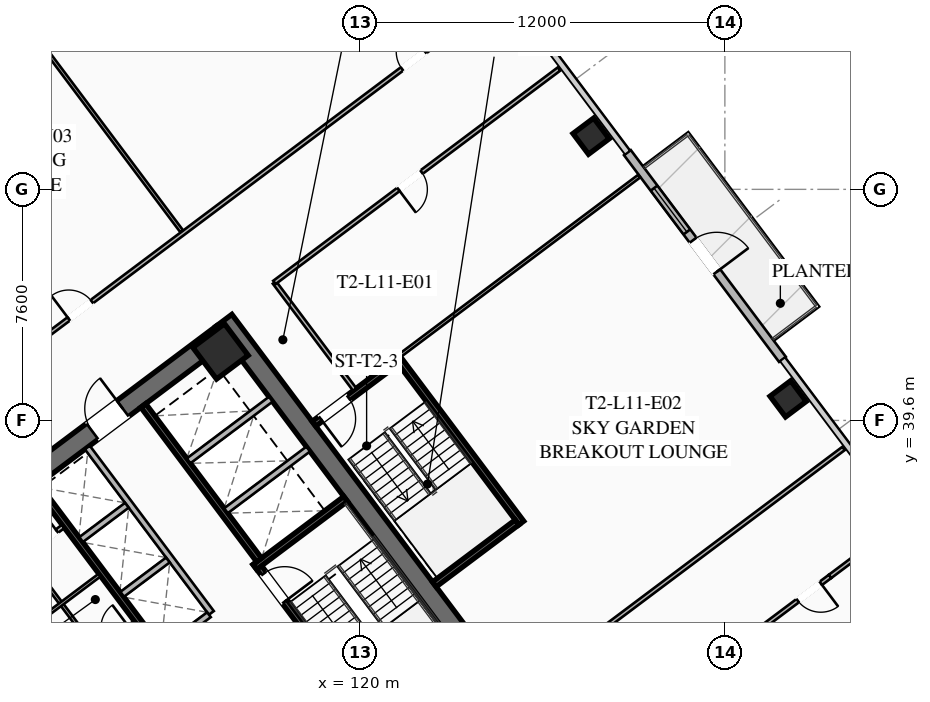
"""IFC4 building model, lengths in metres.
Left out: names, types, materials, properties, quantities, classifications, styles, units other than length and angle.
Written with IfcOpenShell. Run it as: python <this file> out.ifc"""

import sys

from ifc_helpers import new_model, si_unit, direction, frame, frame_2d, origin, origin_2d, place, context, subcontext, project, spatial, rectangle, hollow_rectangle, extrude, element, fill, save


model = new_model("IFC4")
c1 = context("Model", 3, precision=1e-05, world=origin(), true_north=direction((0.0, 1.0)))
c2 = subcontext(c1, "Body", "Model", "MODEL_VIEW")
j1 = project(units=[si_unit("LENGTHUNIT", "METRE"), si_unit("PLANEANGLEUNIT", "RADIAN")], contexts=[c1])
p1 = place(None, origin())
s1 = spatial("IfcSite", under=j1, at=p1, CompositionType="ELEMENT")
p2 = place(p1, origin())
s2 = spatial("IfcBuilding", under=s1, at=p2, CompositionType="ELEMENT")
p3 = place(p2, frame((0.0, 0.0, 45.9)))
s3 = spatial("IfcBuildingStorey", under=s2, at=p3, CompositionType="ELEMENT", Elevation=45.9)
for number, where, z_axis, x_axis in (
    (1, (112.476, 21.107, 0.0), (0.0, 0.0, 1.0), (-0.6, 0.8, 0.0)),
    (2, (115.524, 42.893, 0.0), (0.0, 0.0, 1.0), (0.6, -0.8, 0.0)),
):
    element("IfcWall", number, at=place(p3, frame(where, z_axis=z_axis, x_axis=x_axis)), inside=s3, PredefinedType="SHEAR", context=c2, shape_type="SweptSolid", body=[
        extrude(rectangle(XDim=15.6, YDim=0.65, at=frame_2d((7.8, 0.0))), origin(), (0.0, 0.0, 1.0), 3.55),
    ])
p4 = place(p3, frame((103.571, 33.522, 0.0), z_axis=(0.0, 0.0, 1.0), x_axis=(0.799998028465, 0.600002628705, 0.0)))
e3 = element("IfcWall", 3, at=p4, inside=s3, PredefinedType="SHEAR", context=c2, shape_type="SweptSolid", body=[
    extrude(rectangle(XDim=14.86, YDim=0.65, at=frame_2d((7.43, 0.0))), origin(), (0.0, 0.0, 1.0), 3.55),
])
p5 = place(p4, frame((4.48, 0.0, 0.0)))
e4 = element("IfcOpeningElement", 4, at=p5, cuts=e3, PredefinedType="OPENING", context=c2, shape_type="SweptSolid", body=[
    extrude(rectangle(XDim=1.25, YDim=2.25, at=frame_2d((0.625, 1.125))), frame((0.0, 0.335, 0.0), z_axis=(0.0, -1.0, 0.0), x_axis=(1.0, 0.0, 0.0)), (0.0, 0.0, 1.0), 0.67),
])
p6 = place(p4, frame((9.53, 0.0, 0.0)))
e5 = element("IfcOpeningElement", 5, at=p6, cuts=e3, PredefinedType="OPENING", context=c2, shape_type="SweptSolid", body=[
    extrude(rectangle(XDim=1.25, YDim=2.25, at=frame_2d((0.625, 1.125))), frame((0.0, 0.335, 0.0), z_axis=(0.0, -1.0, 0.0), x_axis=(1.0, 0.0, 0.0)), (0.0, 0.0, 1.0), 0.67),
])
p7 = place(p3, frame((115.41, 41.87, 0.0), z_axis=(0.0, 0.0, 1.0), x_axis=(0.799999996291, 0.600000004945, 0.0)))
e6 = element("IfcColumn", 6, at=p7, inside=s3, PredefinedType="COLUMN", context=c2, shape_type="SweptSolid", body=[
    extrude(hollow_rectangle(XDim=1.3, YDim=1.3, WallThickness=0.05, at=origin_2d()), origin(), (0.0, 0.0, 1.0), 3.35),
])
for number, where, z_axis, x_axis in (
    (7, (134.08, 40.31, 0.0), (0.0, 0.0, 1.0), (0.8, 0.6, 0.0)),
    (8, (127.6, 48.95, 0.0), (0.0, 0.0, 1.0), (0.8, 0.6, 0.0)),
):
    element("IfcColumn", number, at=place(p3, frame(where, z_axis=z_axis, x_axis=x_axis)), inside=s3, PredefinedType="COLUMN", context=c2, shape_type="SweptSolid", body=[
        extrude(hollow_rectangle(XDim=0.85, YDim=0.85, WallThickness=0.035, at=origin_2d()), origin(), (0.0, 0.0, 1.0), 3.35),
    ])
p8 = place(p3, frame((128.794, 48.408, 0.0), z_axis=(0.0, 0.0, 1.0), x_axis=(0.600004595526, -0.799996553335, 0.0)))
e9 = element("IfcWall", 9, at=p8, inside=s3, PredefinedType="SOLIDWALL", context=c2, shape_type="SweptSolid", body=[
    extrude(rectangle(XDim=8.5, YDim=0.28, at=frame_2d((4.25, 0.0))), origin(), (0.0, 0.0, 1.0), 3.35),
])
p9 = place(p8, frame((3.6, 0.0, 0.0)))
e10 = element("IfcOpeningElement", 10, at=p9, cuts=e9, PredefinedType="OPENING", context=c2, shape_type="SweptSolid", body=[
    extrude(rectangle(XDim=1.3, YDim=2.15, at=frame_2d((0.65, 1.075))), frame((0.0, 0.15, 0.0), z_axis=(0.0, -1.0, 0.0), x_axis=(1.0, 0.0, 0.0)), (0.0, 0.0, 1.0), 0.3),
])
p10 = place(p8, frame((1.46, 0.0, 0.85)))
e11 = element("IfcOpeningElement", 11, at=p10, cuts=e9, PredefinedType="OPENING", context=c2, shape_type="SweptSolid", body=[
    extrude(rectangle(XDim=1.8, YDim=1.92, at=frame_2d((0.9, 0.96))), frame((0.0, 0.15, 0.0), z_axis=(0.0, -1.0, 0.0), x_axis=(1.0, 0.0, 0.0)), (0.0, 0.0, 1.0), 0.3),
])
p11 = place(p3, frame((111.44, 29.08, 0.0), z_axis=(0.0, 0.0, 1.0), x_axis=(-0.600009827119, 0.799992629566, 0.0)))
e12 = element("IfcWall", 12, at=p11, inside=s3, PredefinedType="SHEAR", context=c2, shape_type="SweptSolid", body=[
    extrude(rectangle(XDim=7.95, YDim=0.2, at=frame_2d((3.975, 0.0))), origin(), (0.0, 0.0, 1.0), 3.35),
])
p12 = place(p11, frame((0.45, 0.0, 0.0)))
e13 = element("IfcOpeningElement", 13, at=p12, cuts=e12, PredefinedType="OPENING", context=c2, shape_type="SweptSolid", body=[
    extrude(rectangle(XDim=1.15, YDim=2.2, at=frame_2d((0.575, 1.1))), frame((0.0, 0.11, 0.0), z_axis=(0.0, -1.0, 0.0), x_axis=(1.0, 0.0, 0.0)), (0.0, 0.0, 1.0), 0.22),
])
p13 = place(p3, frame((116.56, 34.92, 0.0), z_axis=(0.0, 0.0, 1.0), x_axis=(0.600009827119, -0.799992629566, 0.0)))
e14 = element("IfcWall", 14, at=p13, inside=s3, PredefinedType="SHEAR", context=c2, shape_type="SweptSolid", body=[
    extrude(rectangle(XDim=7.95, YDim=0.2, at=frame_2d((3.975, 0.0))), origin(), (0.0, 0.0, 1.0), 3.35),
])
p14 = place(p13, frame((0.45, 0.0, 0.0)))
e15 = element("IfcOpeningElement", 15, at=p14, cuts=e14, PredefinedType="OPENING", context=c2, shape_type="SweptSolid", body=[
    extrude(rectangle(XDim=1.15, YDim=2.2, at=frame_2d((0.575, 1.1))), frame((0.0, 0.11, 0.0), z_axis=(0.0, -1.0, 0.0), x_axis=(1.0, 0.0, 0.0)), (0.0, 0.0, 1.0), 0.22),
])
p15 = place(p3, frame((116.54, 34.78, 0.0), z_axis=(0.0, 0.0, 1.0), x_axis=(0.799984290658, 0.600020945218, 0.0)))
e16 = element("IfcWall", 16, at=p15, inside=s3, PredefinedType="SHEAR", context=c2, shape_type="SweptSolid", body=[
    extrude(rectangle(XDim=3.73, YDim=0.2, at=frame_2d((1.865, 0.0))), origin(), (0.0, 0.0, 1.0), 3.35),
])
p16 = place(p3, frame((117.938, 26.016, 0.0), z_axis=(0.0, 0.0, 1.0), x_axis=(-0.600005463273, 0.799995902516, 0.0)))
e17 = element("IfcWall", 17, at=p16, inside=s3, PredefinedType="SHEAR", context=c2, shape_type="SweptSolid", body=[
    extrude(rectangle(XDim=14.3, YDim=0.2, at=frame_2d((7.15, 0.0))), origin(), (0.0, 0.0, 1.0), 3.35),
])
p17 = place(p3, frame((110.104, 31.028, 0.0), z_axis=(0.0, 0.0, 1.0), x_axis=(0.800018601094, 0.59997519774, 0.0)))
e18 = element("IfcWall", 18, at=p17, inside=s3, PredefinedType="SOLIDWALL", context=c2, shape_type="SweptSolid", body=[
    extrude(rectangle(XDim=3.15, YDim=0.22, at=frame_2d((1.575, 0.0))), origin(), (0.0, 0.0, 1.0), 2.703),
])
p18 = place(p17, frame((0.25, 0.0, 0.0)))
e19 = element("IfcOpeningElement", 19, at=p18, cuts=e18, PredefinedType="OPENING", context=c2, shape_type="SweptSolid", body=[
    extrude(rectangle(XDim=0.95, YDim=2.05, at=frame_2d((0.475, 1.025))), frame((0.0, 0.12, 0.0), z_axis=(0.0, -1.0, 0.0), x_axis=(1.0, 0.0, 0.0)), (0.0, 0.0, 1.0), 0.24),
])
p19 = place(p17, frame((1.95, 0.0, 0.0)))
e20 = element("IfcOpeningElement", 20, at=p19, cuts=e18, PredefinedType="OPENING", context=c2, shape_type="SweptSolid", body=[
    extrude(rectangle(XDim=0.95, YDim=2.05, at=frame_2d((0.475, 1.025))), frame((0.0, 0.12, 0.0), z_axis=(0.0, -1.0, 0.0), x_axis=(1.0, 0.0, 0.0)), (0.0, 0.0, 1.0), 0.24),
])
p20 = place(p3, frame((112.87, 40.09, 0.0), z_axis=(0.0, 0.0, 1.0), x_axis=(0.599975393228, -0.800018454488, 0.0)))
e21 = element("IfcWall", 21, at=p20, inside=s3, PredefinedType="SHEAR", context=c2, shape_type="SweptSolid", body=[
    extrude(rectangle(XDim=6.35, YDim=0.2, at=frame_2d((3.175, 0.0))), origin(), (0.0, 0.0, 1.0), 3.35),
])
for number, where, z_axis, x_axis in (
    (22, (115.59, 36.63, 0.0), (0.0, 0.0, 1.0), (0.8, 0.6, 0.0)),
    (23, (114.36, 38.27, 0.0), (0.0, 0.0, 1.0), (0.8, 0.6, 0.0)),
):
    element("IfcWall", number, at=place(p3, frame(where, z_axis=z_axis, x_axis=x_axis)), inside=s3, PredefinedType="SOLIDWALL", context=c2, shape_type="SweptSolid", body=[
        extrude(rectangle(XDim=3.38, YDim=0.2, at=frame_2d((1.69, 0.0))), origin(), (0.0, 0.0, 1.0), 3.35),
    ])
p21 = place(p3, frame((107.71, 34.22, 0.0), z_axis=(0.0, 0.0, 1.0), x_axis=(0.799981399002, 0.60002480053, 0.0)))
e24 = element("IfcWall", 24, at=p21, inside=s3, PredefinedType="PARTITIONING", context=c2, shape_type="SweptSolid", body=[
    extrude(rectangle(XDim=3.15, YDim=0.135, at=frame_2d((1.575, 0.0))), origin(), (0.0, 0.0, 1.0), 2.703),
])
p22 = place(p21, frame((0.25, 0.0, 0.0)))
e25 = element("IfcOpeningElement", 25, at=p22, cuts=e24, PredefinedType="OPENING", context=c2, shape_type="SweptSolid", body=[
    extrude(rectangle(XDim=0.95, YDim=2.05, at=frame_2d((0.475, 1.025))), frame((0.0, 0.077, 0.0), z_axis=(0.0, -1.0, 0.0), x_axis=(1.0, 0.0, 0.0)), (0.0, 0.0, 1.0), 0.155),
])
p23 = place(p21, frame((1.95, 0.0, 0.0)))
e26 = element("IfcOpeningElement", 26, at=p23, cuts=e24, PredefinedType="OPENING", context=c2, shape_type="SweptSolid", body=[
    extrude(rectangle(XDim=0.95, YDim=2.05, at=frame_2d((0.475, 1.025))), frame((0.0, 0.077, 0.0), z_axis=(0.0, -1.0, 0.0), x_axis=(1.0, 0.0, 0.0)), (0.0, 0.0, 1.0), 0.155),
])
p24 = place(p3, frame((111.296, 32.072, 0.0), z_axis=(0.0, 0.0, 1.0), x_axis=(-0.59995887973, 0.800030838552, 0.0)))
e27 = element("IfcWall", 27, at=p24, inside=s3, PredefinedType="PARTITIONING", context=c2, shape_type="SweptSolid", body=[
    extrude(rectangle(XDim=3.8, YDim=0.11, at=frame_2d((1.9, 0.0))), origin(), (0.0, 0.0, 1.0), 2.703),
])
p25 = place(p3, frame((108.91, 32.62, 0.0), z_axis=(0.0, 0.0, 1.0), x_axis=(0.800018601094, 0.59997519774, 0.0)))
e28 = element("IfcWall", 28, at=p25, inside=s3, PredefinedType="PARTITIONING", context=c2, shape_type="SweptSolid", body=[
    extrude(rectangle(XDim=3.15, YDim=0.11, at=frame_2d((1.575, 0.0))), origin(), (0.0, 0.0, 1.0), 2.703),
])
p26 = place(p3, frame((115.11, 33.27, 0.0), z_axis=(0.0, 0.0, 1.0), x_axis=(-0.600011488909, 0.79999138319, 0.0)))
e29 = element("IfcWall", 29, at=p26, inside=s3, PredefinedType="SOLIDWALL", context=c2, shape_type="SweptSolid", body=[
    extrude(rectangle(XDim=6.8, YDim=0.2, at=frame_2d((3.4, 0.0))), origin(), (0.0, 0.0, 1.0), 3.35),
])
p27 = place(p3, frame((113.526, 32.082, 0.0), z_axis=(0.0, 0.0, 1.0), x_axis=(0.800046745961, 0.599937666993, 0.0)))
e30 = element("IfcWall", 30, at=p27, inside=s3, PredefinedType="SOLIDWALL", context=c2, shape_type="SweptSolid", body=[
    extrude(rectangle(XDim=1.88, YDim=0.2, at=frame_2d((0.94, 0.0))), origin(), (0.0, 0.0, 1.0), 3.35),
])
p28 = place(p3, frame((112.176, 33.882, 0.0), z_axis=(0.0, 0.0, 1.0), x_axis=(0.8, 0.6, 0.0)))
e31 = element("IfcWall", 31, at=p28, inside=s3, PredefinedType="SOLIDWALL", context=c2, shape_type="SweptSolid", body=[
    extrude(rectangle(XDim=1.88, YDim=0.2, at=frame_2d((0.94, 0.0))), origin(), (0.0, 0.0, 1.0), 3.35),
])
p29 = place(p3, frame((110.826, 35.682, 0.0), z_axis=(0.0, 0.0, 1.0), x_axis=(0.799984418148, 0.600020775241, 0.0)))
e32 = element("IfcWall", 32, at=p29, inside=s3, PredefinedType="SOLIDWALL", context=c2, shape_type="SweptSolid", body=[
    extrude(rectangle(XDim=1.88, YDim=0.2, at=frame_2d((0.94, 0.0))), origin(), (0.0, 0.0, 1.0), 3.35),
])
p30 = place(p3, frame((125.304, 36.228, 0.0), z_axis=(0.0, 0.0, 1.0), x_axis=(-0.59998851072, 0.800008616831, 0.0)))
e33 = element("IfcWall", 33, at=p30, inside=s3, PredefinedType="SHEAR", context=c2, shape_type="SweptSolid", body=[
    extrude(rectangle(XDim=6.8, YDim=0.2, at=frame_2d((3.4, 0.0))), origin(), (0.0, 0.0, 1.0), 3.35),
])
p31 = place(p3, frame((121.204, 41.528, 0.0), z_axis=(0.0, 0.0, 1.0), x_axis=(-0.800017232136, -0.599977023131, 0.0)))
e34 = element("IfcWall", 34, at=p31, inside=s3, PredefinedType="SHEAR", context=c2, shape_type="SweptSolid", body=[
    extrude(rectangle(XDim=3.4, YDim=0.2, at=frame_2d((1.7, 0.0))), origin(), (0.0, 0.0, 1.0), 3.35),
])
p32 = place(p31, frame((1.975, 0.0, 0.0)))
e35 = element("IfcOpeningElement", 35, at=p32, cuts=e34, PredefinedType="OPENING", context=c2, shape_type="SweptSolid", body=[
    extrude(rectangle(XDim=1.15, YDim=2.2, at=frame_2d((0.575, 1.1))), frame((0.0, 0.11, 0.0), z_axis=(0.0, -1.0, 0.0), x_axis=(1.0, 0.0, 0.0)), (0.0, 0.0, 1.0), 0.22),
])
p33 = place(p3, frame((122.444, 34.208, 0.0), z_axis=(0.0, 0.0, 1.0), x_axis=(0.79999138319, 0.600011488909, 0.0)))
e36 = element("IfcWall", 36, at=p33, inside=s3, PredefinedType="SHEAR", context=c2, shape_type="SweptSolid", body=[
    extrude(rectangle(XDim=3.4, YDim=0.2, at=frame_2d((1.7, 0.0))), origin(), (0.0, 0.0, 1.0), 3.35),
])
p34 = place(p3, frame((119.824, 40.618, 0.0), z_axis=(0.0, 0.0, 1.0), x_axis=(-0.599982243973, 0.800013316712, 0.0)))
e37 = element("IfcWall", 37, at=p34, inside=s3, PredefinedType="PARTITIONING", context=c2, shape_type="SweptSolid", body=[
    extrude(rectangle(XDim=4.4, YDim=0.135, at=frame_2d((2.2, 0.0))), origin(), (0.0, 0.0, 1.0), 2.703),
])
p35 = place(p3, frame((98.516, 34.012, 0.0), z_axis=(0.0, 0.0, 1.0), x_axis=(0.799998035726, 0.600002619023, 0.0)))
e38 = element("IfcWall", 38, at=p35, inside=s3, PredefinedType="PARTITIONING", context=c2, shape_type="SweptSolid", body=[
    extrude(rectangle(XDim=29.83, YDim=0.135, at=frame_2d((14.915, 0.0))), origin(), (0.0, 0.0, 1.0), 2.703),
])
p36 = place(p35, frame((0.3, 0.0, 0.0)))
e39 = element("IfcOpeningElement", 39, at=p36, cuts=e38, PredefinedType="OPENING", context=c2, shape_type="SweptSolid", body=[
    extrude(rectangle(XDim=0.95, YDim=2.05, at=frame_2d((0.475, 1.025))), frame((0.0, 0.077, 0.0), z_axis=(0.0, -1.0, 0.0), x_axis=(1.0, 0.0, 0.0)), (0.0, 0.0, 1.0), 0.155),
])
p37 = place(p35, frame((10.835, 0.0, 0.0)))
e40 = element("IfcOpeningElement", 40, at=p37, cuts=e38, PredefinedType="OPENING", context=c2, shape_type="SweptSolid", body=[
    extrude(rectangle(XDim=0.95, YDim=2.05, at=frame_2d((0.475, 1.025))), frame((0.0, 0.077, 0.0), z_axis=(0.0, -1.0, 0.0), x_axis=(1.0, 0.0, 0.0)), (0.0, 0.0, 1.0), 0.155),
])
p38 = place(p35, frame((14.879, 0.0, 0.0)))
e41 = element("IfcOpeningElement", 41, at=p38, cuts=e38, PredefinedType="OPENING", context=c2, shape_type="SweptSolid", body=[
    extrude(rectangle(XDim=0.95, YDim=2.05, at=frame_2d((0.475, 1.025))), frame((0.0, 0.077, 0.0), z_axis=(0.0, -1.0, 0.0), x_axis=(1.0, 0.0, 0.0)), (0.0, 0.0, 1.0), 0.155),
])
p39 = place(p35, frame((28.58, 0.0, 0.0)))
e42 = element("IfcOpeningElement", 42, at=p39, cuts=e38, PredefinedType="OPENING", context=c2, shape_type="SweptSolid", body=[
    extrude(rectangle(XDim=0.95, YDim=2.05, at=frame_2d((0.475, 1.025))), frame((0.0, 0.077, 0.0), z_axis=(0.0, -1.0, 0.0), x_axis=(1.0, 0.0, 0.0)), (0.0, 0.0, 1.0), 0.155),
])
p40 = place(p3, frame((114.132, 45.824, 0.0), z_axis=(0.0, 0.0, 1.0), x_axis=(-0.600007301277, 0.79999452399, 0.0)))
e43 = element("IfcWall", 43, at=p40, inside=s3, PredefinedType="PARTITIONING", context=c2, shape_type="SweptSolid", body=[
    extrude(rectangle(XDim=10.7, YDim=0.11, at=frame_2d((5.35, 0.0))), origin(), (0.0, 0.0, 1.0), 2.703),
])
p41 = place(p3, frame((135.46, 34.47, 0.0), z_axis=(0.0, 0.0, 1.0), x_axis=(-0.800000982127, -0.599998690494, 0.0)))
e44 = element("IfcWall", 44, at=p41, inside=s3, PredefinedType="PARTITIONING", context=c2, shape_type="SweptSolid", body=[
    extrude(rectangle(XDim=29.83, YDim=0.135, at=frame_2d((14.915, 0.0))), origin(), (0.0, 0.0, 1.0), 2.703),
])
p42 = place(p41, frame((28.5, 0.0, 0.0)))
e45 = element("IfcOpeningElement", 45, at=p42, cuts=e44, PredefinedType="OPENING", context=c2, shape_type="SweptSolid", body=[
    extrude(rectangle(XDim=0.95, YDim=2.05, at=frame_2d((0.475, 1.025))), frame((0.0, 0.077, 0.0), z_axis=(0.0, -1.0, 0.0), x_axis=(1.0, 0.0, 0.0)), (0.0, 0.0, 1.0), 0.155),
])
p43 = place(p41, frame((17.892, 0.0, 0.0)))
e46 = element("IfcOpeningElement", 46, at=p43, cuts=e44, PredefinedType="OPENING", context=c2, shape_type="SweptSolid", body=[
    extrude(rectangle(XDim=0.95, YDim=2.05, at=frame_2d((0.475, 1.025))), frame((0.0, 0.077, 0.0), z_axis=(0.0, -1.0, 0.0), x_axis=(1.0, 0.0, 0.0)), (0.0, 0.0, 1.0), 0.155),
])
p44 = place(p41, frame((0.38, 0.0, 0.0)))
e47 = element("IfcOpeningElement", 47, at=p44, cuts=e44, PredefinedType="OPENING", context=c2, shape_type="SweptSolid", body=[
    extrude(rectangle(XDim=0.95, YDim=2.05, at=frame_2d((0.475, 1.025))), frame((0.0, 0.077, 0.0), z_axis=(0.0, -1.0, 0.0), x_axis=(1.0, 0.0, 0.0)), (0.0, 0.0, 1.0), 0.155),
])
p45 = place(p3, frame((135.46, 34.47, 0.0), z_axis=(0.0, 0.0, 1.0), x_axis=(0.799990331366, 0.600012891296, 0.0)))
e48 = element("IfcWall", 48, at=p45, inside=s3, PredefinedType="PARTITIONING", context=c2, shape_type="SweptSolid", body=[
    extrude(rectangle(XDim=3.03, YDim=0.135, at=frame_2d((1.515, 0.0))), origin(), (0.0, 0.0, 1.0), 2.703),
])
p46 = place(p3, frame((126.544, 51.158, 0.0), z_axis=(0.0, 0.0, 1.0), x_axis=(-0.799994991918, -0.600006677385, 0.0)))
e49 = element("IfcWall", 49, at=p46, inside=s3, PredefinedType="PARTITIONING", context=c2, shape_type="SweptSolid", body=[
    extrude(rectangle(XDim=11.7, YDim=0.135, at=frame_2d((5.85, 0.0))), origin(), (0.0, 0.0, 1.0), 2.703),
])
p47 = place(p46, frame((5.65, 0.0, 0.0)))
e50 = element("IfcOpeningElement", 50, at=p47, cuts=e49, PredefinedType="OPENING", context=c2, shape_type="SweptSolid", body=[
    extrude(rectangle(XDim=0.95, YDim=2.05, at=frame_2d((0.475, 1.025))), frame((0.0, 0.077, 0.0), z_axis=(0.0, -1.0, 0.0), x_axis=(1.0, 0.0, 0.0)), (0.0, 0.0, 1.0), 0.155),
])
p48 = place(p3, frame((125.208, 30.656, 0.0), z_axis=(0.0, 0.0, 1.0), x_axis=(0.800002191231, 0.599997078347, 0.0)))
e51 = element("IfcWall", 51, at=p48, inside=s3, PredefinedType="PARTITIONING", context=c2, shape_type="SweptSolid", body=[
    extrude(rectangle(XDim=13.37, YDim=0.135, at=frame_2d((6.685, 0.0))), origin(), (0.0, 0.0, 1.0), 2.703),
])
p49 = place(p48, frame((2.045, 0.0, 0.0)))
e52 = element("IfcOpeningElement", 52, at=p49, cuts=e51, PredefinedType="OPENING", context=c2, shape_type="SweptSolid", body=[
    extrude(rectangle(XDim=0.95, YDim=2.05, at=frame_2d((0.475, 1.025))), frame((0.0, 0.077, 0.0), z_axis=(0.0, -1.0, 0.0), x_axis=(1.0, 0.0, 0.0)), (0.0, 0.0, 1.0), 0.155),
])
p50 = place(p3, frame((129.184, 47.638, 0.0), z_axis=(0.0, 0.0, 1.0), x_axis=(-0.800008922773, -0.599988102785, 0.0)))
e53 = element("IfcWall", 53, at=p50, inside=s3, PredefinedType="PARTITIONING", context=c2, shape_type="SweptSolid", body=[
    extrude(rectangle(XDim=9.85, YDim=0.11, at=frame_2d((4.925, 0.0))), origin(), (0.0, 0.0, 1.0), 2.703),
])
p51 = place(p3, frame((111.548, 16.636, 0.0), z_axis=(0.0, 0.0, 1.0), x_axis=(-0.600003610192, 0.799997292343, 0.0)))
e54 = element("IfcWall", 54, at=p51, inside=s3, PredefinedType="PARTITIONING", context=c2, shape_type="SweptSolid", body=[
    extrude(rectangle(XDim=21.64, YDim=0.135, at=frame_2d((10.82, 0.0))), origin(), (0.0, 0.0, 1.0), 2.703),
])
p52 = place(p51, frame((0.3, 0.0, 0.0)))
e55 = element("IfcOpeningElement", 55, at=p52, cuts=e54, PredefinedType="OPENING", context=c2, shape_type="SweptSolid", body=[
    extrude(rectangle(XDim=0.95, YDim=2.05, at=frame_2d((0.475, 1.025))), frame((0.0, 0.077, 0.0), z_axis=(0.0, -1.0, 0.0), x_axis=(1.0, 0.0, 0.0)), (0.0, 0.0, 1.0), 0.155),
])
p53 = place(p9, origin())
e56 = element("IfcDoor", 56, at=p53, inside=s3, OperationType="SINGLE_SWING_RIGHT", PredefinedType="DOOR", context=c2, shape_type="SweptSolid", body=[
    extrude(rectangle(XDim=1.3, YDim=2.15, at=frame_2d((0.65, 1.075))), frame((0.0, 0.025, 0.0), z_axis=(0.0, -1.0, 0.0), x_axis=(1.0, 0.0, 0.0)), (0.0, 0.0, 1.0), 0.05),
])
fill(e10, e56)
p54 = place(p10, origin())
e57 = element("IfcWindow", 57, at=p54, inside=s3, PartitioningType="SINGLE_PANEL", PredefinedType="WINDOW", context=c2, shape_type="SweptSolid", body=[
    extrude(rectangle(XDim=1.8, YDim=1.92, at=frame_2d((0.9, 0.96))), frame((0.0, 0.03, 0.0), z_axis=(0.0, -1.0, 0.0), x_axis=(1.0, 0.0, 0.0)), (0.0, 0.0, 1.0), 0.06),
])
fill(e11, e57)
p55 = place(p6, origin())
e58 = element("IfcDoor", 58, at=p55, inside=s3, OperationType="SINGLE_SWING_RIGHT", PredefinedType="DOOR", context=c2, shape_type="SweptSolid", body=[
    extrude(rectangle(XDim=1.25, YDim=2.25, at=frame_2d((0.625, 1.125))), frame((0.0, 0.025, 0.0), z_axis=(0.0, -1.0, 0.0), x_axis=(1.0, 0.0, 0.0)), (0.0, 0.0, 1.0), 0.05),
])
fill(e5, e58)
p56 = place(p14, origin())
e59 = element("IfcDoor", 59, at=p56, inside=s3, OperationType="SINGLE_SWING_RIGHT", PredefinedType="DOOR", context=c2, shape_type="SweptSolid", body=[
    extrude(rectangle(XDim=1.15, YDim=2.2, at=frame_2d((0.575, 1.1))), frame((0.0, 0.025, 0.0), z_axis=(0.0, -1.0, 0.0), x_axis=(1.0, 0.0, 0.0)), (0.0, 0.0, 1.0), 0.05),
])
fill(e15, e59)
p57 = place(p23, origin())
e60 = element("IfcDoor", 60, at=p57, inside=s3, OperationType="SINGLE_SWING_RIGHT", PredefinedType="DOOR", context=c2, shape_type="SweptSolid", body=[
    extrude(rectangle(XDim=0.95, YDim=2.05, at=frame_2d((0.475, 1.025))), frame((0.0, 0.025, 0.0), z_axis=(0.0, -1.0, 0.0), x_axis=(1.0, 0.0, 0.0)), (0.0, 0.0, 1.0), 0.05),
])
fill(e26, e60)
p58 = place(p32, origin())
e61 = element("IfcDoor", 61, at=p58, inside=s3, OperationType="SINGLE_SWING_RIGHT", PredefinedType="DOOR", context=c2, shape_type="SweptSolid", body=[
    extrude(rectangle(XDim=1.15, YDim=2.2, at=frame_2d((0.575, 1.1))), frame((0.0, 0.025, 0.0), z_axis=(0.0, -1.0, 0.0), x_axis=(1.0, 0.0, 0.0)), (0.0, 0.0, 1.0), 0.05),
])
fill(e35, e61)
p59 = place(p38, origin())
e62 = element("IfcDoor", 62, at=p59, inside=s3, OperationType="SINGLE_SWING_LEFT", PredefinedType="DOOR", context=c2, shape_type="SweptSolid", body=[
    extrude(rectangle(XDim=0.95, YDim=2.05, at=frame_2d((0.475, 1.025))), frame((0.0, 0.025, 0.0), z_axis=(0.0, -1.0, 0.0), x_axis=(1.0, 0.0, 0.0)), (0.0, 0.0, 1.0), 0.05),
])
fill(e41, e62)
p60 = place(p39, origin())
e63 = element("IfcDoor", 63, at=p60, inside=s3, OperationType="SINGLE_SWING_RIGHT", PredefinedType="DOOR", context=c2, shape_type="SweptSolid", body=[
    extrude(rectangle(XDim=0.95, YDim=2.05, at=frame_2d((0.475, 1.025))), frame((0.0, 0.025, 0.0), z_axis=(0.0, -1.0, 0.0), x_axis=(1.0, 0.0, 0.0)), (0.0, 0.0, 1.0), 0.05),
])
fill(e42, e63)
p61 = place(p44, origin())
e64 = element("IfcDoor", 64, at=p61, inside=s3, OperationType="SINGLE_SWING_LEFT", PredefinedType="DOOR", context=c2, shape_type="SweptSolid", body=[
    extrude(rectangle(XDim=0.95, YDim=2.05, at=frame_2d((0.475, 1.025))), frame((0.0, 0.025, 0.0), z_axis=(0.0, -1.0, 0.0), x_axis=(1.0, 0.0, 0.0)), (0.0, 0.0, 1.0), 0.05),
])
fill(e47, e64)
p62 = place(p47, origin())
e65 = element("IfcDoor", 65, at=p62, inside=s3, OperationType="SINGLE_SWING_RIGHT", PredefinedType="DOOR", context=c2, shape_type="SweptSolid", body=[
    extrude(rectangle(XDim=0.95, YDim=2.05, at=frame_2d((0.475, 1.025))), frame((0.0, 0.025, 0.0), z_axis=(0.0, -1.0, 0.0), x_axis=(1.0, 0.0, 0.0)), (0.0, 0.0, 1.0), 0.05),
])
fill(e50, e65)
save(model, sys.argv[1])
